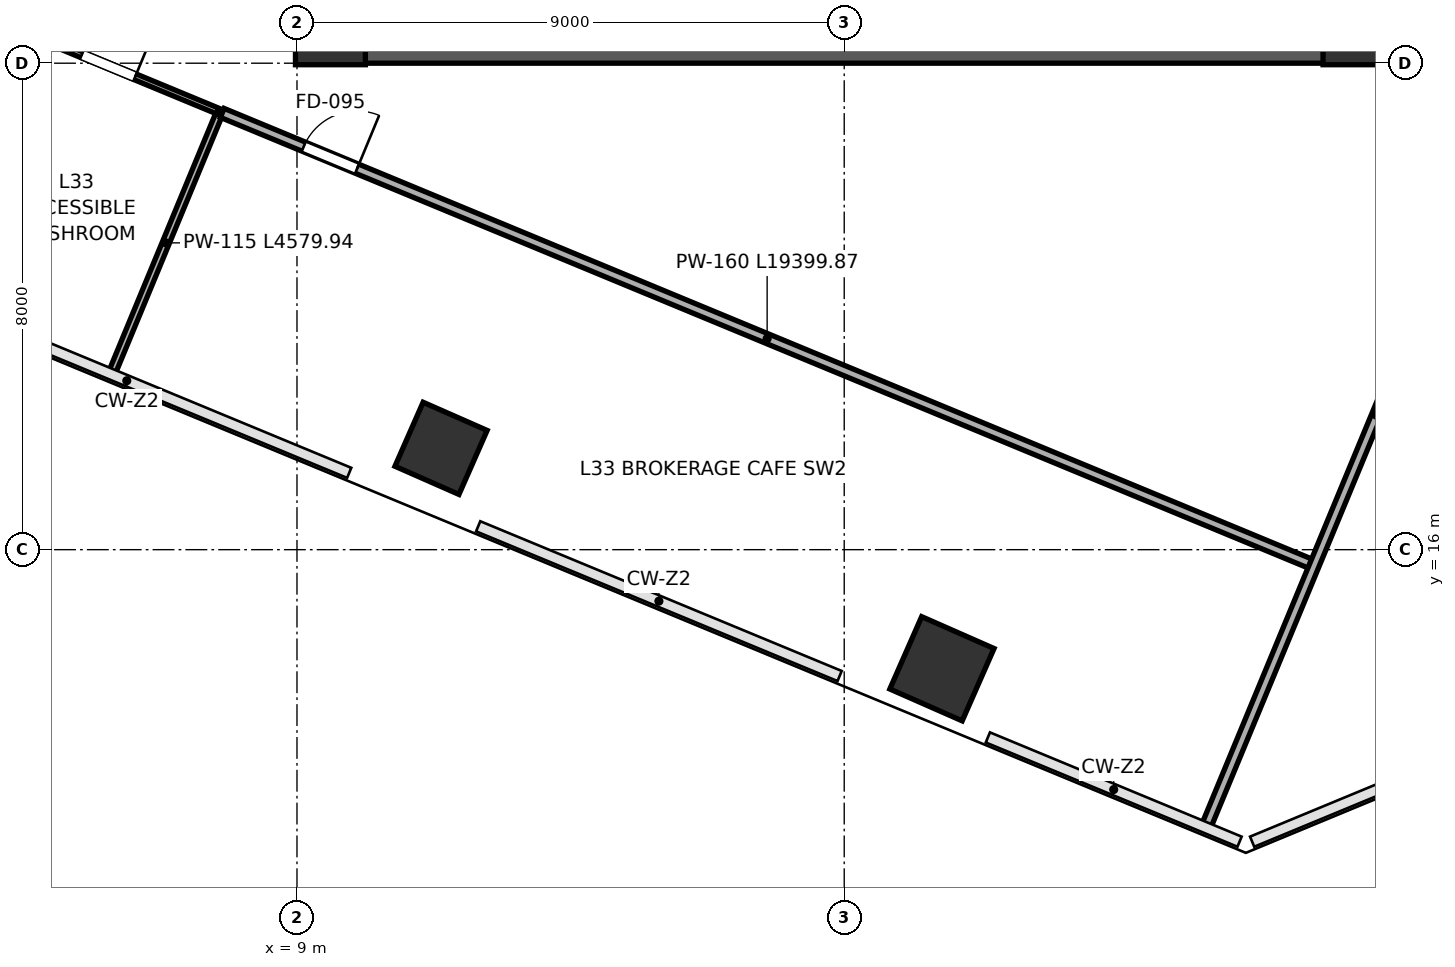
"""IFC4 building model, lengths in metres.
Left out: names, types, materials, properties, quantities, classifications, styles, units other than length and angle.
Written with IfcOpenShell. Run it as: python <this file> out.ifc"""

import sys

from ifc_helpers import new_model, si_unit, direction, frame, frame_2d, origin, origin_2d, place, context, subcontext, project, spatial, rectangle, extrude, clip, halfspace, source, transform, mapped, element, fill, save


model = new_model("IFC4")
c1 = context("Model", 3, precision=1e-05, world=origin(), true_north=direction((0.0, 1.0)))
c2 = subcontext(c1, "Body", "Model", "MODEL_VIEW")
j1 = project(units=[si_unit("LENGTHUNIT", "METRE"), si_unit("PLANEANGLEUNIT", "RADIAN")], contexts=[c1])
p1 = place(None, origin())
s1 = spatial("IfcSite", under=j1, at=p1, CompositionType="ELEMENT")
p2 = place(p1, origin())
s2 = spatial("IfcBuilding", under=s1, at=p2, CompositionType="ELEMENT")
p3 = place(p2, frame((0.0, 0.0, 149.8)))
s3 = spatial("IfcBuildingStorey", under=s2, at=p3, CompositionType="ELEMENT", Elevation=149.8)
m1 = source(origin(), c2, "Body", "SweptSolid", [
    extrude(rectangle(XDim=1.15, YDim=1.15, at=origin_2d()), origin(), (0.0, 0.0, 1.0), 4.198),
])
for number, where, z_axis, x_axis in (
    (1, (9.55, 24.55, 0.001), (0.0, 0.0, 1.0), (1.0, 0.0, 0.0)),
    (2, (26.45, 24.55, 0.001), (0.0, 0.0, 1.0), (1.0, 0.0, 0.0)),
):
    element("IfcColumn", number, at=place(p3, frame(where, z_axis=z_axis, x_axis=x_axis)), inside=s3, PredefinedType="COLUMN", context=c2, shape_type="MappedRepresentation", body=[
        mapped(m1, transform((0.0, 0.0, 0.0), scale=1.0)),
    ])
p4 = place(p3, frame((11.369, 17.666, 0.0), z_axis=(-0.073577292822, 0.053200261293, 0.995869526685), x_axis=(0.86133259686, 0.506723750126, 0.036567726806)))
e3 = element("IfcColumn", 3, at=p4, inside=s3, PredefinedType="COLUMN", context=c2, shape_type="Clipping", body=[
    clip(clip(extrude(rectangle(XDim=1.15, YDim=1.15, at=origin_2d()), origin(), (0.0, 0.0, 1.0), 4.217), halfspace(frame((0.0, 0.0, 0.07), z_axis=(0.0, 0.0, -1.0), x_axis=(1.0, 0.0, 0.0)), False)), halfspace(frame((0.0, 0.0, 4.147), z_axis=(0.0, 0.0, 1.0), x_axis=(1.0, 0.0, 0.0)), False)),
])
p5 = place(p3, frame((19.607, 14.042, 0.0), z_axis=(-0.092716689124, 0.010822734623, 0.995633709741), x_axis=(0.504406839453, 0.862647300668, 0.037594879473)))
e4 = element("IfcColumn", 4, at=p5, inside=s3, PredefinedType="COLUMN", context=c2, shape_type="Clipping", body=[
    clip(clip(extrude(rectangle(XDim=1.3, YDim=1.3, at=origin_2d()), origin(), (0.0, 0.0, 1.0), 4.218), halfspace(frame((0.0, 0.0, 0.081), z_axis=(0.0, 0.0, -1.0), x_axis=(1.0, 0.0, 0.0)), False)), halfspace(frame((0.0, 0.0, 4.137), z_axis=(0.0, 0.0, 1.0), x_axis=(1.0, 0.0, 0.0)), False)),
])
p6 = place(p3, frame((9.0, 24.225, 0.0), z_axis=(0.0, 0.0, 1.0), x_axis=(1.0, 0.0, 0.0)))
e5 = element("IfcWall", 5, at=p6, inside=s3, PredefinedType="SHEAR", context=c2, shape_type="SweptSolid", body=[
    extrude(rectangle(XDim=18.0, YDim=0.45, at=frame_2d((9.0, 0.0))), origin(), (0.0, 0.0, 1.0), 3.96),
])
p7 = place(p3, frame((5.966, 18.93, 0.0), z_axis=(0.0, 0.0, 1.0), x_axis=(0.382676631985, 0.923882349292, 0.0)))
e6 = element("IfcWall", 6, at=p7, inside=s3, PredefinedType="PARTITIONING", context=c2, shape_type="SweptSolid", body=[
    extrude(rectangle(XDim=4.58, YDim=0.115, at=frame_2d((2.29, 0.0))), origin(), (0.0, 0.0, 1.0), 3.195),
])
p8 = place(p3, frame((0.186, 26.325, 0.0), z_axis=(0.0, 0.0, 1.0), x_axis=(0.923871890562, -0.382701881142, 0.0)))
e7 = element("IfcWall", 7, at=p8, inside=s3, PredefinedType="PARTITIONING", context=c2, shape_type="SweptSolid", body=[
    extrude(rectangle(XDim=8.13, YDim=0.1, at=frame_2d((4.065, 0.0))), origin(), (0.0, 0.0, 1.0), 3.96),
])
p9 = place(p8, frame((3.61, 0.0, 0.0)))
e8 = element("IfcOpeningElement", 8, at=p9, cuts=e7, PredefinedType="OPENING", context=c2, shape_type="SweptSolid", body=[
    extrude(rectangle(XDim=0.9, YDim=2.15, at=frame_2d((0.45, 1.075))), frame((0.0, 0.06, 0.0), z_axis=(0.0, -1.0, 0.0), x_axis=(1.0, 0.0, 0.0)), (0.0, 0.0, 1.0), 0.12),
])
p10 = place(p8, frame((5.71, 0.0, 0.0)))
e9 = element("IfcOpeningElement", 9, at=p10, cuts=e7, PredefinedType="OPENING", context=c2, shape_type="SweptSolid", body=[
    extrude(rectangle(XDim=0.95, YDim=2.15, at=frame_2d((0.475, 1.075))), frame((0.0, 0.06, 0.0), z_axis=(0.0, -1.0, 0.0), x_axis=(1.0, 0.0, 0.0)), (0.0, 0.0, 1.0), 0.12),
])
p11 = place(p3, frame((7.771, 23.183, 0.0), z_axis=(0.0, 0.0, 1.0), x_axis=(0.923878020857, -0.382687081801, 0.0)))
e10 = element("IfcWall", 10, at=p11, inside=s3, PredefinedType="PARTITIONING", context=c2, shape_type="SweptSolid", body=[
    extrude(rectangle(XDim=19.4, YDim=0.16, at=frame_2d((9.7, 0.0))), origin(), (0.0, 0.0, 1.0), 3.96),
])
p12 = place(p11, frame((1.45, 0.0, 0.0)))
e11 = element("IfcOpeningElement", 11, at=p12, cuts=e10, PredefinedType="OPENING", context=c2, shape_type="SweptSolid", body=[
    extrude(rectangle(XDim=0.95, YDim=2.15, at=frame_2d((0.475, 1.075))), frame((0.0, 0.09, 0.0), z_axis=(0.0, -1.0, 0.0), x_axis=(1.0, 0.0, 0.0)), (0.0, 0.0, 1.0), 0.18),
])
p13 = place(p3, frame((23.963, 11.475, 0.0), z_axis=(0.0, 0.0, 1.0), x_axis=(0.382686018031, 0.923878461489, 0.0)))
e12 = element("IfcWall", 12, at=p13, inside=s3, PredefinedType="PARTITIONING", context=c2, shape_type="SweptSolid", body=[
    extrude(rectangle(XDim=14.58, YDim=0.16, at=frame_2d((7.29, 0.0))), origin(), (0.0, 0.0, 1.0), 3.96),
])
m2 = source(origin(), c2, "Body", "SweptSolid", [
    extrude(rectangle(XDim=0.95, YDim=2.15, at=frame_2d((0.475, 1.075))), frame((0.0, 0.025, 0.0), z_axis=(0.0, -1.0, 0.0), x_axis=(1.0, 0.0, 0.0)), (0.0, 0.0, 1.0), 0.05),
])
p14 = place(p10, origin())
e13 = element("IfcDoor", 13, at=p14, inside=s3, OperationType="SINGLE_SWING_RIGHT", PredefinedType="DOOR", context=c2, shape_type="MappedRepresentation", body=[
    mapped(m2, transform((0.0, 0.0, 0.0), scale=1.0)),
])
fill(e9, e13)
m3 = source(origin(), c2, "Body", "SweptSolid", [
    extrude(rectangle(XDim=0.95, YDim=2.15, at=frame_2d((0.475, 1.075))), frame((0.0, 0.025, 0.0), z_axis=(0.0, -1.0, 0.0), x_axis=(1.0, 0.0, 0.0)), (0.0, 0.0, 1.0), 0.05),
])
p15 = place(p12, origin())
e14 = element("IfcDoor", 14, at=p15, inside=s3, OperationType="SINGLE_SWING_RIGHT", PredefinedType="DOOR", context=c2, shape_type="MappedRepresentation", body=[
    mapped(m3, transform((0.0, 0.0, 0.0), scale=1.0)),
])
fill(e11, e14)
save(model, sys.argv[1])
